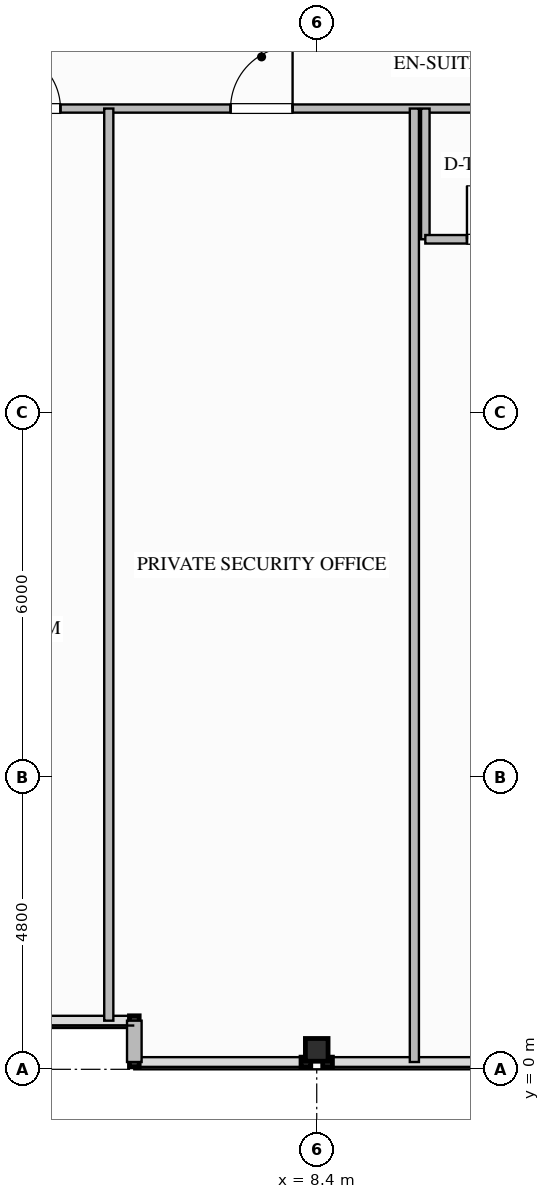
"""IFC4 building model, lengths in metres.
Left out: names, types, materials, properties, quantities, classifications, styles, units other than length and angle.
Written with IfcOpenShell. Run it as: python <this file> out.ifc"""

import sys

from ifc_helpers import new_model, si_unit, direction, frame, frame_2d, origin, origin_2d, place, context, subcontext, project, spatial, rectangle, i_section, extrude, element, fill, save


model = new_model("IFC4")
c1 = context("Model", 3, precision=1e-05, world=origin(), true_north=direction((0.0, 1.0)))
c2 = subcontext(c1, "Body", "Model", "MODEL_VIEW")
j1 = project(units=[si_unit("LENGTHUNIT", "METRE"), si_unit("PLANEANGLEUNIT", "RADIAN")], contexts=[c1])
p1 = place(None, origin())
s1 = spatial("IfcSite", under=j1, at=p1, CompositionType="ELEMENT")
p2 = place(p1, origin())
s2 = spatial("IfcBuilding", under=s1, at=p2, CompositionType="ELEMENT")
p3 = place(p2, frame((0.0, 0.0, 248.3)))
s3 = spatial("IfcBuildingStorey", under=s2, at=p3, CompositionType="ELEMENT", Elevation=248.3)
p4 = place(p3, frame((8.4, 0.32, 0.0), z_axis=(0.0, 0.0, 1.0), x_axis=(0.0, 1.0, 0.0)))
e1 = element("IfcColumn", 1, at=p4, inside=s3, PredefinedType="COLUMN", context=c2, shape_type="SweptSolid", body=[
    extrude(i_section(OverallWidth=0.374, OverallDepth=0.372, WebThickness=0.016, FlangeThickness=0.026, FilletRadius=0.025, at=origin_2d()), origin(), (0.0, 0.0, 1.0), 3.597),
])
p5 = place(p3, frame((5.4, 0.12, 0.0), z_axis=(0.0, 0.0, 1.0), x_axis=(0.0, 1.0, 0.0)))
e2 = element("IfcWall", 2, at=p5, inside=s3, PredefinedType="STANDARD", context=c2, shape_type="SweptSolid", body=[
    extrude(rectangle(XDim=0.68, YDim=0.24, at=frame_2d((0.34, 0.0))), origin(), (0.0, 0.0, 1.0), 3.34),
])
p6 = place(p3, frame((-16.2, 15.8, 0.0), z_axis=(0.0, 0.0, 1.0), x_axis=(1.0, 0.0, 0.0)))
e3 = element("IfcWall", 3, at=p6, inside=s3, PredefinedType="PARTITIONING", context=c2, shape_type="SweptSolid", body=[
    extrude(rectangle(XDim=38.28, YDim=0.135, at=frame_2d((19.14, 0.0))), origin(), (0.0, 0.0, 1.0), 3.34),
])
p7 = place(p6, frame((33.355, 0.0, 0.0)))
e4 = element("IfcOpeningElement", 4, at=p7, cuts=e3, PredefinedType="OPENING", context=c2, shape_type="SweptSolid", body=[
    extrude(rectangle(XDim=1.26, YDim=2.2, at=frame_2d((0.63, 1.1))), frame((0.0, 0.077, 0.0), z_axis=(0.0, -1.0, 0.0), x_axis=(1.0, 0.0, 0.0)), (0.0, 0.0, 1.0), 0.155),
])
p8 = place(p6, frame((1.252, 0.0, 0.0)))
e5 = element("IfcOpeningElement", 5, at=p8, cuts=e3, PredefinedType="OPENING", context=c2, shape_type="SweptSolid", body=[
    extrude(rectangle(XDim=1.26, YDim=2.2, at=frame_2d((0.63, 1.1))), frame((0.0, 0.077, 0.0), z_axis=(0.0, -1.0, 0.0), x_axis=(1.0, 0.0, 0.0)), (0.0, 0.0, 1.0), 0.155),
])
p9 = place(p6, frame((7.777, 0.0, 0.0)))
e6 = element("IfcOpeningElement", 6, at=p9, cuts=e3, PredefinedType="OPENING", context=c2, shape_type="SweptSolid", body=[
    extrude(rectangle(XDim=1.02, YDim=2.15, at=frame_2d((0.51, 1.075))), frame((0.0, 0.077, 0.0), z_axis=(0.0, -1.0, 0.0), x_axis=(1.0, 0.0, 0.0)), (0.0, 0.0, 1.0), 0.155),
])
p10 = place(p6, frame((11.445, 0.0, 0.0)))
e7 = element("IfcOpeningElement", 7, at=p10, cuts=e3, PredefinedType="OPENING", context=c2, shape_type="SweptSolid", body=[
    extrude(rectangle(XDim=1.26, YDim=2.2, at=frame_2d((0.63, 1.1))), frame((0.0, 0.077, 0.0), z_axis=(0.0, -1.0, 0.0), x_axis=(1.0, 0.0, 0.0)), (0.0, 0.0, 1.0), 0.155),
])
p11 = place(p6, frame((19.425, 0.0, 0.0)))
e8 = element("IfcOpeningElement", 8, at=p11, cuts=e3, PredefinedType="OPENING", context=c2, shape_type="SweptSolid", body=[
    extrude(rectangle(XDim=0.96, YDim=2.15, at=frame_2d((0.48, 1.075))), frame((0.0, 0.077, 0.0), z_axis=(0.0, -1.0, 0.0), x_axis=(1.0, 0.0, 0.0)), (0.0, 0.0, 1.0), 0.155),
])
p12 = place(p6, frame((23.183, 0.0, 0.0)))
e9 = element("IfcOpeningElement", 9, at=p12, cuts=e3, PredefinedType="OPENING", context=c2, shape_type="SweptSolid", body=[
    extrude(rectangle(XDim=1.02, YDim=2.15, at=frame_2d((0.51, 1.075))), frame((0.0, 0.077, 0.0), z_axis=(0.0, -1.0, 0.0), x_axis=(1.0, 0.0, 0.0)), (0.0, 0.0, 1.0), 0.155),
])
p13 = place(p6, frame((29.888, 0.0, 0.0)))
e10 = element("IfcOpeningElement", 10, at=p13, cuts=e3, PredefinedType="OPENING", context=c2, shape_type="SweptSolid", body=[
    extrude(rectangle(XDim=1.26, YDim=2.2, at=frame_2d((0.63, 1.1))), frame((0.0, 0.077, 0.0), z_axis=(0.0, -1.0, 0.0), x_axis=(1.0, 0.0, 0.0)), (0.0, 0.0, 1.0), 0.155),
])
p14 = place(p3, frame((4.98, 0.8, 0.0), z_axis=(0.0, 0.0, 1.0), x_axis=(0.0, 1.0, 0.0)))
e11 = element("IfcWall", 11, at=p14, inside=s3, PredefinedType="PARTITIONING", context=c2, shape_type="SweptSolid", body=[
    extrude(rectangle(XDim=15.0, YDim=0.15, at=frame_2d((7.5, 0.0))), origin(), (0.0, 0.0, 1.0), 3.34),
])
p15 = place(p3, frame((10.006, 0.12, 0.0), z_axis=(0.0, 0.0, 1.0), x_axis=(0.0, 1.0, 0.0)))
e12 = element("IfcWall", 12, at=p15, inside=s3, PredefinedType="PARTITIONING", context=c2, shape_type="SweptSolid", body=[
    extrude(rectangle(XDim=15.68, YDim=0.15, at=frame_2d((7.84, 0.0))), origin(), (0.0, 0.0, 1.0), 3.34),
])
p16 = place(p3, frame((10.186, 15.8, 0.0), z_axis=(0.0, 0.0, 1.0), x_axis=(0.0, -1.0, 0.0)))
e13 = element("IfcWall", 13, at=p16, inside=s3, PredefinedType="PLUMBINGWALL", context=c2, shape_type="SweptSolid", body=[
    extrude(rectangle(XDim=2.15, YDim=0.14, at=frame_2d((1.075, 0.0))), origin(), (0.0, 0.0, 1.0), 3.34),
])
p17 = place(p3, frame((10.186, 13.65, 0.0), z_axis=(0.0, 0.0, 1.0), x_axis=(1.0, 0.0, 0.0)))
e14 = element("IfcWall", 14, at=p17, inside=s3, PredefinedType="PLUMBINGWALL", context=c2, shape_type="SweptSolid", body=[
    extrude(rectangle(XDim=2.25, YDim=0.14, at=frame_2d((1.125, 0.0))), origin(), (0.0, 0.0, 1.0), 3.34),
])
p18 = place(p17, frame((0.685, 0.0, 0.0)))
e15 = element("IfcOpeningElement", 15, at=p18, cuts=e14, PredefinedType="OPENING", context=c2, shape_type="SweptSolid", body=[
    extrude(rectangle(XDim=0.88, YDim=2.1, at=frame_2d((0.44, 1.05))), frame((0.0, 0.08, 0.0), z_axis=(0.0, -1.0, 0.0), x_axis=(1.0, 0.0, 0.0)), (0.0, 0.0, 1.0), 0.16),
])
p19 = place(p11, origin())
e16 = element("IfcDoor", 16, at=p19, inside=s3, OperationType="SINGLE_SWING_LEFT", PredefinedType="DOOR", context=c2, shape_type="SweptSolid", body=[
    extrude(rectangle(XDim=0.96, YDim=2.15, at=frame_2d((0.48, 1.075))), frame((0.0, 0.025, 0.0), z_axis=(0.0, -1.0, 0.0), x_axis=(1.0, 0.0, 0.0)), (0.0, 0.0, 1.0), 0.05),
])
fill(e8, e16)
p20 = place(p12, origin())
e17 = element("IfcDoor", 17, at=p20, inside=s3, OperationType="SINGLE_SWING_RIGHT", PredefinedType="DOOR", context=c2, shape_type="SweptSolid", body=[
    extrude(rectangle(XDim=1.02, YDim=2.15, at=frame_2d((0.51, 1.075))), frame((0.0, 0.025, 0.0), z_axis=(0.0, -1.0, 0.0), x_axis=(1.0, 0.0, 0.0)), (0.0, 0.0, 1.0), 0.05),
])
fill(e9, e17)
p21 = place(p18, origin())
e18 = element("IfcDoor", 18, at=p21, inside=s3, OperationType="SINGLE_SWING_LEFT", PredefinedType="DOOR", context=c2, shape_type="SweptSolid", body=[
    extrude(rectangle(XDim=0.88, YDim=2.1, at=frame_2d((0.44, 1.05))), frame((0.0, 0.025, 0.0), z_axis=(0.0, -1.0, 0.0), x_axis=(1.0, 0.0, 0.0)), (0.0, 0.0, 1.0), 0.05),
])
fill(e15, e18)
save(model, sys.argv[1])
